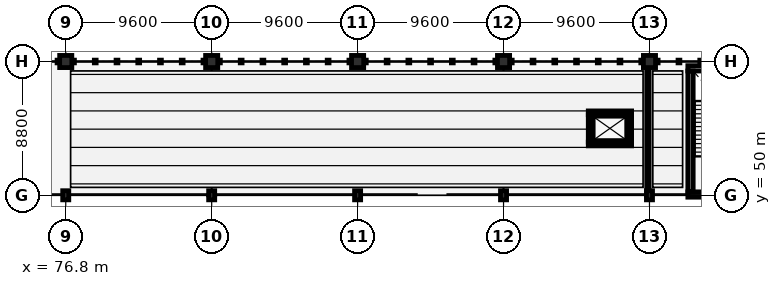
"""IFC4 building model, lengths in metres.
Left out: names, types, materials, properties, quantities, classifications, styles, units other than length and angle.
Written with IfcOpenShell. Run it as: python <this file> out.ifc"""

import sys

from ifc_helpers import new_model, si_unit, direction, frame, frame_2d, origin, origin_2d, place, context, subcontext, project, spatial, rectangle, extrude, element, fill, save


model = new_model("IFC4")
c1 = context("Model", 3, precision=1e-05, world=origin(), true_north=direction((0.0, 1.0)))
c2 = subcontext(c1, "Body", "Model", "MODEL_VIEW")
j1 = project(units=[si_unit("LENGTHUNIT", "METRE"), si_unit("PLANEANGLEUNIT", "RADIAN")], contexts=[c1])
p1 = place(None, origin())
s1 = spatial("IfcSite", under=j1, at=p1, CompositionType="ELEMENT")
p2 = place(p1, origin())
s2 = spatial("IfcBuilding", under=s1, at=p2, CompositionType="ELEMENT")
p3 = place(p2, frame((0.0, 0.0, 4.8)))
s3 = spatial("IfcBuildingStorey", under=s2, at=p3, CompositionType="ELEMENT", Elevation=4.8)
p4 = place(p3, frame((76.8, 50.0, 0.0), z_axis=(0.0, 0.0, 1.0), x_axis=(1.0, 0.0, 0.0)))
e1 = element("IfcColumn", 1, at=p4, inside=s3, PredefinedType="COLUMN", context=c2, shape_type="SweptSolid", body=[
    extrude(rectangle(XDim=0.4, YDim=0.6, at=origin_2d()), origin(), (0.0, 0.0, 1.0), 4.8),
])
p5 = place(p3, frame((76.8, 58.8, 0.0), z_axis=(0.0, 0.0, 1.0), x_axis=(1.0, 0.0, 0.0)))
e2 = element("IfcColumn", 2, at=p5, inside=s3, PredefinedType="COLUMN", context=c2, shape_type="SweptSolid", body=[
    extrude(rectangle(XDim=0.8, YDim=0.8, at=origin_2d()), origin(), (0.0, 0.0, 1.0), 4.8),
])
p6 = place(p3, frame((86.4, 50.0, 0.0), z_axis=(0.0, 0.0, 1.0), x_axis=(1.0, 0.0, 0.0)))
e3 = element("IfcColumn", 3, at=p6, inside=s3, PredefinedType="COLUMN", context=c2, shape_type="SweptSolid", body=[
    extrude(rectangle(XDim=0.4, YDim=0.6, at=origin_2d()), origin(), (0.0, 0.0, 1.0), 4.8),
])
p7 = place(p3, frame((86.4, 58.8, 0.0), z_axis=(0.0, 0.0, 1.0), x_axis=(1.0, 0.0, 0.0)))
e4 = element("IfcColumn", 4, at=p7, inside=s3, PredefinedType="COLUMN", context=c2, shape_type="SweptSolid", body=[
    extrude(rectangle(XDim=0.8, YDim=0.8, at=origin_2d()), origin(), (0.0, 0.0, 1.0), 4.8),
])
p8 = place(p3, frame((96.0, 50.0, 0.0), z_axis=(0.0, 0.0, 1.0), x_axis=(1.0, 0.0, 0.0)))
e5 = element("IfcColumn", 5, at=p8, inside=s3, PredefinedType="COLUMN", context=c2, shape_type="SweptSolid", body=[
    extrude(rectangle(XDim=0.4, YDim=0.6, at=origin_2d()), origin(), (0.0, 0.0, 1.0), 4.8),
])
p9 = place(p3, frame((96.0, 58.8, 0.0), z_axis=(0.0, 0.0, 1.0), x_axis=(1.0, 0.0, 0.0)))
e6 = element("IfcColumn", 6, at=p9, inside=s3, PredefinedType="COLUMN", context=c2, shape_type="SweptSolid", body=[
    extrude(rectangle(XDim=0.8, YDim=0.8, at=origin_2d()), origin(), (0.0, 0.0, 1.0), 4.8),
])
p10 = place(p3, frame((105.6, 50.0, 0.0), z_axis=(0.0, 0.0, 1.0), x_axis=(1.0, 0.0, 0.0)))
e7 = element("IfcColumn", 7, at=p10, inside=s3, PredefinedType="COLUMN", context=c2, shape_type="SweptSolid", body=[
    extrude(rectangle(XDim=0.4, YDim=0.6, at=origin_2d()), origin(), (0.0, 0.0, 1.0), 4.8),
])
p11 = place(p3, frame((105.6, 58.8, 0.0), z_axis=(0.0, 0.0, 1.0), x_axis=(1.0, 0.0, 0.0)))
e8 = element("IfcColumn", 8, at=p11, inside=s3, PredefinedType="COLUMN", context=c2, shape_type="SweptSolid", body=[
    extrude(rectangle(XDim=0.8, YDim=0.8, at=origin_2d()), origin(), (0.0, 0.0, 1.0), 4.8),
])
p12 = place(p3, frame((115.2, 50.0, 0.0), z_axis=(0.0, 0.0, 1.0), x_axis=(1.0, 0.0, 0.0)))
e9 = element("IfcColumn", 9, at=p12, inside=s3, PredefinedType="COLUMN", context=c2, shape_type="SweptSolid", body=[
    extrude(rectangle(XDim=0.4, YDim=0.6, at=origin_2d()), origin(), (0.0, 0.0, 1.0), 4.8),
])
p13 = place(p3, frame((115.2, 58.8, 0.0), z_axis=(0.0, 0.0, 1.0), x_axis=(1.0, 0.0, 0.0)))
e10 = element("IfcColumn", 10, at=p13, inside=s3, PredefinedType="COLUMN", context=c2, shape_type="SweptSolid", body=[
    extrude(rectangle(XDim=0.8, YDim=0.8, at=origin_2d()), origin(), (0.0, 0.0, 1.0), 4.8),
])
for number, where, z_axis, x_axis in (
    (11, (123.375, 50.05, 0.0), (0.0, 0.0, 1.0), (-1.0, 0.0, 0.0)),
    (12, (117.725, 58.35, 0.0), (0.0, 0.0, 1.0), (1.0, 0.0, 0.0)),
):
    element("IfcWall", number, at=place(p3, frame(where, z_axis=z_axis, x_axis=x_axis)), inside=s3, PredefinedType="SHEAR", context=c2, shape_type="SweptSolid", body=[
        extrude(rectangle(XDim=5.65, YDim=0.35, at=frame_2d((2.825, 0.0))), origin(), (0.0, 0.0, 1.0), 4.55),
    ])
p14 = place(p3, frame((117.9, 50.225, 0.0), z_axis=(0.0, 0.0, 1.0), x_axis=(0.0, 1.0, 0.0)))
e13 = element("IfcWall", 13, at=p14, inside=s3, PredefinedType="SHEAR", context=c2, shape_type="SweptSolid", body=[
    extrude(rectangle(XDim=7.95, YDim=0.35, at=frame_2d((3.975, 0.0))), origin(), (0.0, 0.0, 1.0), 4.55),
])
p15 = place(p14, frame((0.22, 0.0, 0.0)))
e14 = element("IfcOpeningElement", 14, at=p15, cuts=e13, PredefinedType="OPENING", context=c2, shape_type="SweptSolid", body=[
    extrude(rectangle(XDim=2.05, YDim=2.15, at=frame_2d((1.025, 1.075))), frame((0.0, 0.185, 0.0), z_axis=(0.0, -1.0, 0.0), x_axis=(1.0, 0.0, 0.0)), (0.0, 0.0, 1.0), 0.37),
])
p16 = place(p3, frame((114.025, 53.375, 0.0), z_axis=(0.0, 0.0, 1.0), x_axis=(-1.0, 0.0, 0.0)))
e15 = element("IfcWall", 15, at=p16, inside=s3, PredefinedType="SOLIDWALL", context=c2, shape_type="SweptSolid", body=[
    extrude(rectangle(XDim=2.85, YDim=0.25, at=frame_2d((1.425, 0.0))), origin(), (0.0, 0.0, 1.0), 4.55),
])
p17 = place(p16, frame((0.875, 0.0, 0.0)))
e16 = element("IfcOpeningElement", 16, at=p17, cuts=e15, PredefinedType="OPENING", context=c2, shape_type="SweptSolid", body=[
    extrude(rectangle(XDim=1.1, YDim=2.15, at=frame_2d((0.55, 1.075))), frame((0.0, 0.135, 0.0), z_axis=(0.0, -1.0, 0.0), x_axis=(1.0, 0.0, 0.0)), (0.0, 0.0, 1.0), 0.27),
])
p18 = place(p3, frame((111.175, 55.425, 0.0), z_axis=(0.0, 0.0, 1.0), x_axis=(1.0, 0.0, 0.0)))
e17 = element("IfcWall", 17, at=p18, inside=s3, PredefinedType="SOLIDWALL", context=c2, shape_type="SweptSolid", body=[
    extrude(rectangle(XDim=2.85, YDim=0.25, at=frame_2d((1.425, 0.0))), origin(), (0.0, 0.0, 1.0), 4.55),
])
for number, where, z_axis, x_axis in (
    (18, (111.3, 53.5, 0.0), (0.0, 0.0, 1.0), (0.0, 1.0, 0.0)),
    (19, (113.9, 55.3, 0.0), (0.0, 0.0, 1.0), (0.0, -1.0, 0.0)),
):
    element("IfcWall", number, at=place(p3, frame(where, z_axis=z_axis, x_axis=x_axis)), inside=s3, PredefinedType="SOLIDWALL", context=c2, shape_type="SweptSolid", body=[
        extrude(rectangle(XDim=1.8, YDim=0.25, at=frame_2d((0.9, 0.0))), origin(), (0.0, 0.0, 1.0), 4.55),
    ])
p19 = place(p3, frame((115.1, 49.95, 0.0), z_axis=(0.0, 0.0, 1.0), x_axis=(0.0, 1.0, 0.0)))
e20 = element("IfcWall", 20, at=p19, inside=s3, PredefinedType="PARTITIONING", context=c2, shape_type="SweptSolid", body=[
    extrude(rectangle(XDim=8.8, YDim=0.16, at=frame_2d((4.4, 0.0))), origin(), (0.0, 0.0, 1.0), 4.096),
])
p20 = place(p19, frame((3.5, 0.0, 0.0)))
e21 = element("IfcOpeningElement", 21, at=p20, cuts=e20, PredefinedType="OPENING", context=c2, shape_type="SweptSolid", body=[
    extrude(rectangle(XDim=1.8, YDim=2.15, at=frame_2d((0.9, 1.075))), frame((0.0, 0.09, 0.0), z_axis=(0.0, -1.0, 0.0), x_axis=(1.0, 0.0, 0.0)), (0.0, 0.0, 1.0), 0.18),
])
p21 = place(p15, origin())
e22 = element("IfcDoor", 22, at=p21, inside=s3, OperationType="DOUBLE_DOOR_SINGLE_SWING", PredefinedType="DOOR", context=c2, shape_type="SweptSolid", body=[
    extrude(rectangle(XDim=2.05, YDim=2.15, at=frame_2d((1.025, 1.075))), frame((0.0, 0.025, 0.0), z_axis=(0.0, -1.0, 0.0), x_axis=(1.0, 0.0, 0.0)), (0.0, 0.0, 1.0), 0.05),
])
fill(e14, e22)
p22 = place(p17, origin())
e23 = element("IfcDoor", 23, at=p22, inside=s3, OperationType="DOUBLE_DOOR_SLIDING", PredefinedType="DOOR", context=c2, shape_type="SweptSolid", body=[
    extrude(rectangle(XDim=1.1, YDim=2.15, at=frame_2d((0.55, 1.075))), frame((0.0, 0.025, 0.0), z_axis=(0.0, -1.0, 0.0), x_axis=(1.0, 0.0, 0.0)), (0.0, 0.0, 1.0), 0.05),
])
fill(e16, e23)
p23 = place(p20, origin())
e24 = element("IfcDoor", 24, at=p23, inside=s3, OperationType="DOUBLE_DOOR_SINGLE_SWING", PredefinedType="DOOR", context=c2, shape_type="SweptSolid", body=[
    extrude(rectangle(XDim=1.8, YDim=2.15, at=frame_2d((0.9, 1.075))), frame((0.0, 0.025, 0.0), z_axis=(0.0, -1.0, 0.0), x_axis=(1.0, 0.0, 0.0)), (0.0, 0.0, 1.0), 0.05),
])
fill(e21, e24)
save(model, sys.argv[1])
